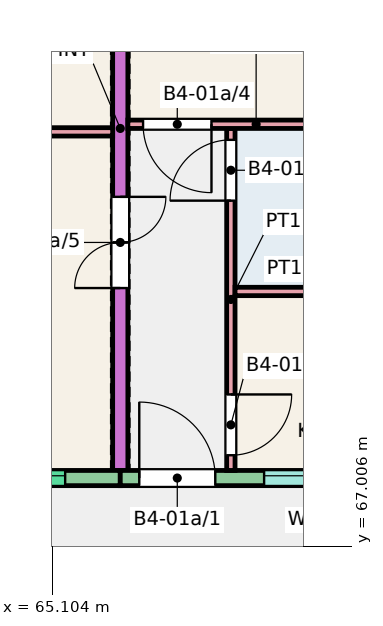
"""IFC4 building model, lengths in metres.
Left out: names, types, materials, properties, quantities, classifications, styles, units other than length and angle.
Written with IfcOpenShell. Run it as: python <this file> out.ifc"""

import sys

from ifc_helpers import new_model, si_unit, direction, frame, frame_2d, origin, place, context, subcontext, project, spatial, rectangle, extrude, element, fill, save


model = new_model("IFC4")
c1 = context("Model", 3, precision=1e-05, world=origin(), true_north=direction((0.0, 1.0)))
c2 = subcontext(c1, "Body", "Model", "MODEL_VIEW")
j1 = project(units=[si_unit("LENGTHUNIT", "METRE"), si_unit("PLANEANGLEUNIT", "RADIAN")], contexts=[c1])
p1 = place(None, origin())
s1 = spatial("IfcSite", under=j1, at=p1, CompositionType="ELEMENT")
p2 = place(p1, origin())
s2 = spatial("IfcBuilding", under=s1, at=p2, CompositionType="ELEMENT")
p3 = place(p2, frame((0.0, 0.0, 3.0)))
s3 = spatial("IfcBuildingStorey", under=s2, at=p3, CompositionType="ELEMENT", Elevation=3.0)
p4 = place(p3, frame((66.0, 68.0, 0.0), z_axis=(0.0, 0.0, 1.0), x_axis=(0.0, 1.0, 0.0)))
e1 = element("IfcWall", 1, at=p4, inside=s3, PredefinedType="SHEAR", context=c2, shape_type="SweptSolid", body=[
    extrude(rectangle(XDim=9.0, YDim=0.2, at=frame_2d((4.5, 0.0))), origin(), (0.0, 0.0, 1.0), 3.0),
])
p5 = place(p4, frame((2.4, 0.0, 0.0)))
e2 = element("IfcOpeningElement", 2, at=p5, cuts=e1, PredefinedType="OPENING", context=c2, shape_type="SweptSolid", body=[
    extrude(rectangle(XDim=1.2, YDim=2.1, at=frame_2d((0.6, 1.05))), frame((0.0, 0.11, 0.0), z_axis=(0.0, -1.0, 0.0), x_axis=(1.0, 0.0, 0.0)), (0.0, 0.0, 1.0), 0.22),
])
p6 = place(p4, frame((6.4, 0.0, 0.0)))
e3 = element("IfcOpeningElement", 3, at=p6, cuts=e1, PredefinedType="OPENING", context=c2, shape_type="SweptSolid", body=[
    extrude(rectangle(XDim=1.2, YDim=2.1, at=frame_2d((0.6, 1.05))), frame((0.0, 0.11, 0.0), z_axis=(0.0, -1.0, 0.0), x_axis=(1.0, 0.0, 0.0)), (0.0, 0.0, 1.0), 0.22),
])
p7 = place(p3, frame((62.55, 67.9, 0.0), z_axis=(0.0, 0.0, 1.0), x_axis=(1.0, 0.0, 0.0)))
e4 = element("IfcWall", 4, at=p7, inside=s3, PredefinedType="SOLIDWALL", context=c2, shape_type="SweptSolid", body=[
    extrude(rectangle(XDim=3.45, YDim=0.2, at=frame_2d((1.725, 0.0))), origin(), (0.0, 0.0, 1.0), 3.0),
])
p8 = place(p7, frame((0.625, 0.0, 1.2)))
e5 = element("IfcOpeningElement", 5, at=p8, cuts=e4, PredefinedType="OPENING", context=c2, shape_type="SweptSolid", body=[
    extrude(rectangle(XDim=2.1, YDim=1.2, at=frame_2d((1.05, 0.6))), frame((0.0, 0.11, 0.0), z_axis=(0.0, -1.0, 0.0), x_axis=(1.0, 0.0, 0.0)), (0.0, 0.0, 1.0), 0.22),
])
p9 = place(p3, frame((66.0, 67.9, 0.0), z_axis=(0.0, 0.0, 1.0), x_axis=(1.0, 0.0, 0.0)))
e6 = element("IfcWall", 6, at=p9, inside=s3, PredefinedType="SOLIDWALL", context=c2, shape_type="SweptSolid", body=[
    extrude(rectangle(XDim=3.6, YDim=0.2, at=frame_2d((1.8, 0.0))), origin(), (0.0, 0.0, 1.0), 3.0),
])
p10 = place(p9, frame((1.893, 0.0, 1.1)))
e7 = element("IfcOpeningElement", 7, at=p10, cuts=e6, PredefinedType="OPENING", context=c2, shape_type="SweptSolid", body=[
    extrude(rectangle(XDim=1.2, YDim=1.3, at=frame_2d((0.6, 0.65))), frame((0.0, 0.11, 0.0), z_axis=(0.0, -1.0, 0.0), x_axis=(1.0, 0.0, 0.0)), (0.0, 0.0, 1.0), 0.22),
])
p11 = place(p9, frame((0.25, 0.0, 0.0)))
e8 = element("IfcOpeningElement", 8, at=p11, cuts=e6, PredefinedType="OPENING", context=c2, shape_type="SweptSolid", body=[
    extrude(rectangle(XDim=1.0, YDim=2.1, at=frame_2d((0.5, 1.05))), frame((0.0, 0.11, 0.0), z_axis=(0.0, -1.0, 0.0), x_axis=(1.0, 0.0, 0.0)), (0.0, 0.0, 1.0), 0.22),
])
p12 = place(p3, frame((67.455, 68.0, 0.0), z_axis=(0.0, 0.0, 1.0), x_axis=(0.0, 1.0, 0.0)))
e9 = element("IfcWall", 9, at=p12, inside=s3, PredefinedType="PARTITIONING", context=c2, shape_type="SweptSolid", body=[
    extrude(rectangle(XDim=4.5, YDim=0.11, at=frame_2d((2.25, 0.0))), origin(), (0.0, 0.0, 1.0), 2.8),
])
p13 = place(p12, frame((0.2, 0.0, 0.0)))
e10 = element("IfcOpeningElement", 10, at=p13, cuts=e9, PredefinedType="OPENING", context=c2, shape_type="SweptSolid", body=[
    extrude(rectangle(XDim=0.8, YDim=2.1, at=frame_2d((0.4, 1.05))), frame((0.0, 0.065, 0.0), z_axis=(0.0, -1.0, 0.0), x_axis=(1.0, 0.0, 0.0)), (0.0, 0.0, 1.0), 0.13),
])
p14 = place(p12, frame((3.55, 0.0, 0.0)))
e11 = element("IfcOpeningElement", 11, at=p14, cuts=e9, PredefinedType="OPENING", context=c2, shape_type="SweptSolid", body=[
    extrude(rectangle(XDim=0.8, YDim=2.1, at=frame_2d((0.4, 1.05))), frame((0.0, 0.065, 0.0), z_axis=(0.0, -1.0, 0.0), x_axis=(1.0, 0.0, 0.0)), (0.0, 0.0, 1.0), 0.13),
])
p15 = place(p3, frame((67.51, 70.355, 0.0), z_axis=(0.0, 0.0, 1.0), x_axis=(1.0, 0.0, 0.0)))
e12 = element("IfcWall", 12, at=p15, inside=s3, PredefinedType="PARTITIONING", context=c2, shape_type="SweptSolid", body=[
    extrude(rectangle(XDim=1.965, YDim=0.11, at=frame_2d((0.982, 0.0))), origin(), (0.0, 0.0, 1.0), 2.8),
])
p16 = place(p3, frame((66.1, 72.555, 0.0), z_axis=(0.0, 0.0, 1.0), x_axis=(1.0, 0.0, 0.0)))
e13 = element("IfcWall", 13, at=p16, inside=s3, PredefinedType="PARTITIONING", context=c2, shape_type="SweptSolid", body=[
    extrude(rectangle(XDim=3.375, YDim=0.11, at=frame_2d((1.688, 0.0))), origin(), (0.0, 0.0, 1.0), 2.8),
])
p17 = place(p16, frame((0.2, 0.0, 0.0)))
e14 = element("IfcOpeningElement", 14, at=p17, cuts=e13, PredefinedType="OPENING", context=c2, shape_type="SweptSolid", body=[
    extrude(rectangle(XDim=0.9, YDim=2.1, at=frame_2d((0.45, 1.05))), frame((0.0, 0.065, 0.0), z_axis=(0.0, -1.0, 0.0), x_axis=(1.0, 0.0, 0.0)), (0.0, 0.0, 1.0), 0.13),
])
p18 = place(p3, frame((62.55, 72.455, 0.0), z_axis=(0.0, 0.0, 1.0), x_axis=(1.0, 0.0, 0.0)))
e15 = element("IfcWall", 15, at=p18, inside=s3, PredefinedType="PARTITIONING", context=c2, shape_type="SweptSolid", body=[
    extrude(rectangle(XDim=3.35, YDim=0.11, at=frame_2d((1.675, 0.0))), origin(), (0.0, 0.0, 1.0), 2.8),
])
p19 = place(p8, origin())
e16 = element("IfcWindow", 16, at=p19, inside=s3, PartitioningType="SINGLE_PANEL", PredefinedType="WINDOW", context=c2, shape_type="SweptSolid", body=[
    extrude(rectangle(XDim=2.1, YDim=1.2, at=frame_2d((1.05, 0.6))), frame((0.0, 0.06, 0.0), z_axis=(0.0, -1.0, 0.0), x_axis=(1.0, 0.0, 0.0)), (0.0, 0.0, 1.0), 0.06),
])
fill(e5, e16)
p20 = place(p10, origin())
e17 = element("IfcWindow", 17, at=p20, inside=s3, PartitioningType="SINGLE_PANEL", PredefinedType="WINDOW", context=c2, shape_type="SweptSolid", body=[
    extrude(rectangle(XDim=1.2, YDim=1.3, at=frame_2d((0.6, 0.65))), frame((0.0, 0.06, 0.0), z_axis=(0.0, -1.0, 0.0), x_axis=(1.0, 0.0, 0.0)), (0.0, 0.0, 1.0), 0.06),
])
fill(e7, e17)
p21 = place(p11, origin())
e18 = element("IfcDoor", 18, at=p21, inside=s3, OperationType="SINGLE_SWING_LEFT", PredefinedType="DOOR", context=c2, shape_type="SweptSolid", body=[
    extrude(rectangle(XDim=1.0, YDim=2.1, at=frame_2d((0.5, 1.05))), frame((0.0, 0.025, 0.0), z_axis=(0.0, -1.0, 0.0), x_axis=(1.0, 0.0, 0.0)), (0.0, 0.0, 1.0), 0.05),
])
fill(e8, e18)
p22 = place(p13, origin())
e19 = element("IfcDoor", 19, at=p22, inside=s3, OperationType="SINGLE_SWING_RIGHT", PredefinedType="DOOR", context=c2, shape_type="SweptSolid", body=[
    extrude(rectangle(XDim=0.8, YDim=2.1, at=frame_2d((0.4, 1.05))), frame((0.0, 0.025, 0.0), z_axis=(0.0, -1.0, 0.0), x_axis=(1.0, 0.0, 0.0)), (0.0, 0.0, 1.0), 0.05),
])
fill(e10, e19)
p23 = place(p14, origin())
e20 = element("IfcDoor", 20, at=p23, inside=s3, OperationType="SINGLE_SWING_LEFT", PredefinedType="DOOR", context=c2, shape_type="SweptSolid", body=[
    extrude(rectangle(XDim=0.8, YDim=2.1, at=frame_2d((0.4, 1.05))), frame((0.0, 0.025, 0.0), z_axis=(0.0, -1.0, 0.0), x_axis=(1.0, 0.0, 0.0)), (0.0, 0.0, 1.0), 0.05),
])
fill(e11, e20)
p24 = place(p17, origin())
e21 = element("IfcDoor", 21, at=p24, inside=s3, OperationType="SINGLE_SWING_RIGHT", PredefinedType="DOOR", context=c2, shape_type="SweptSolid", body=[
    extrude(rectangle(XDim=0.9, YDim=2.1, at=frame_2d((0.45, 1.05))), frame((0.0, 0.025, 0.0), z_axis=(0.0, -1.0, 0.0), x_axis=(1.0, 0.0, 0.0)), (0.0, 0.0, 1.0), 0.05),
])
fill(e14, e21)
p25 = place(p5, origin())
e22 = element("IfcDoor", 22, at=p25, inside=s3, OperationType="DOUBLE_DOOR_SINGLE_SWING", PredefinedType="DOOR", context=c2, shape_type="SweptSolid", body=[
    extrude(rectangle(XDim=1.2, YDim=2.1, at=frame_2d((0.6, 1.05))), frame((0.0, 0.025, 0.0), z_axis=(0.0, -1.0, 0.0), x_axis=(1.0, 0.0, 0.0)), (0.0, 0.0, 1.0), 0.05),
])
fill(e2, e22)
save(model, sys.argv[1])
